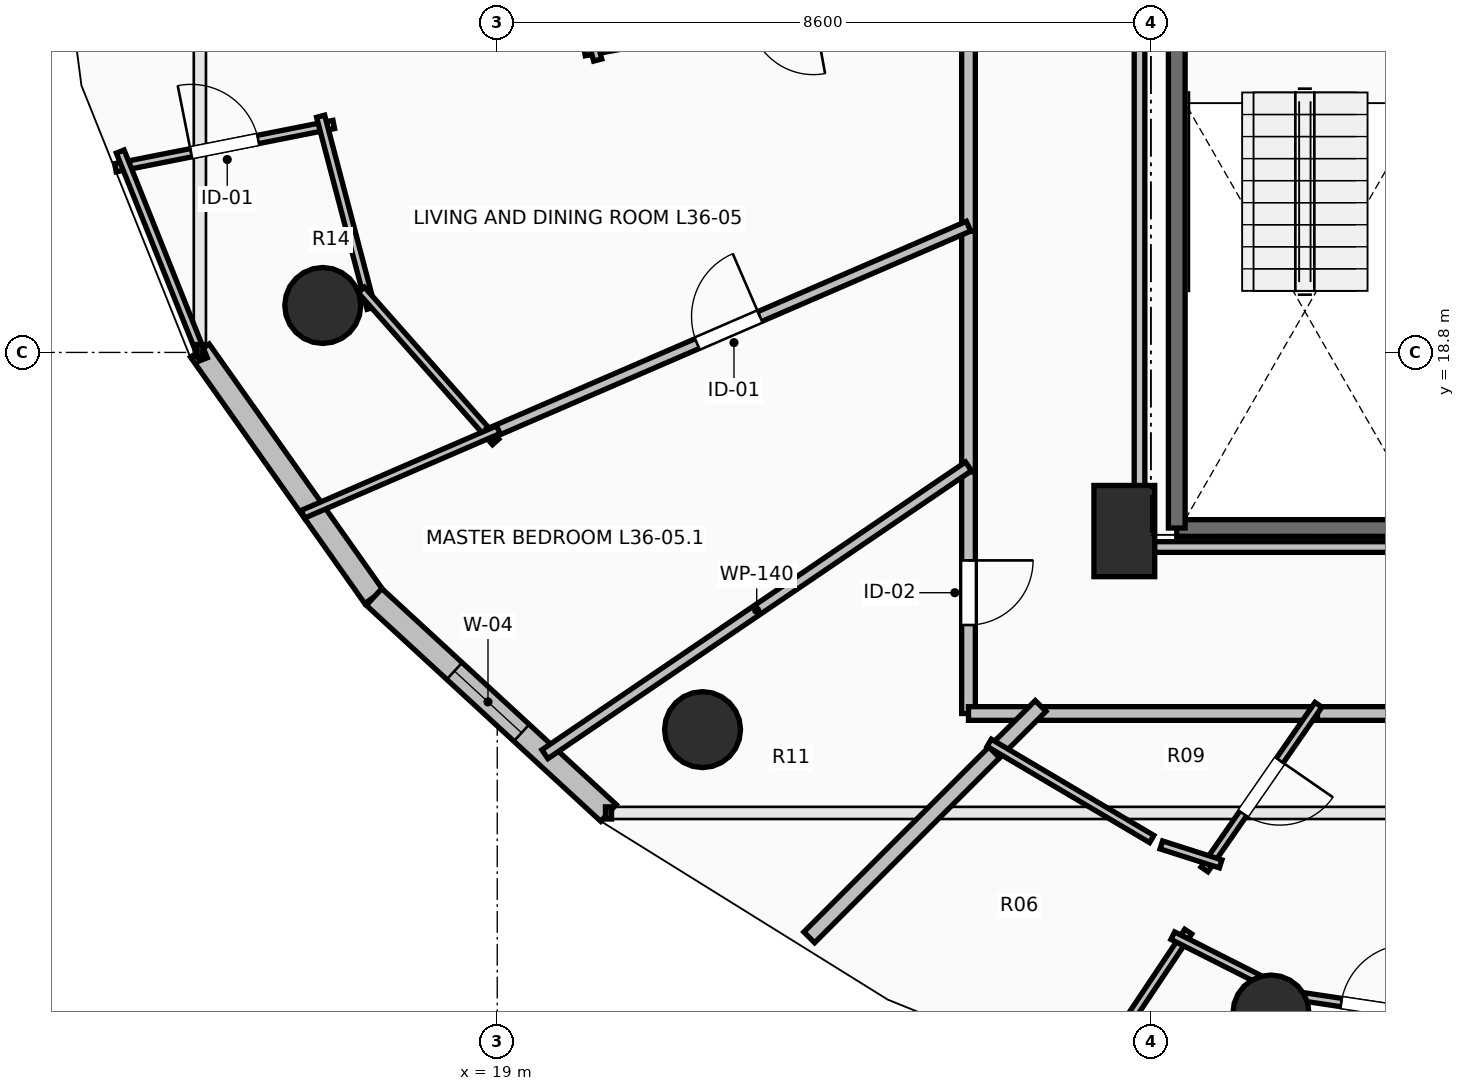
"""IFC4 building model, lengths in metres.
Left out: names, types, materials, properties, quantities, classifications, styles, units other than length and angle.
Written with IfcOpenShell. Run it as: python <this file> out.ifc"""

import sys

from ifc_helpers import new_model, si_unit, direction, frame, frame_2d, origin, origin_2d, place, context, subcontext, project, spatial, rectangle, circle, extrude, element, fill, save


model = new_model("IFC4")
c1 = context("Model", 3, precision=1e-05, world=origin(), true_north=direction((0.0, 1.0)))
c2 = subcontext(c1, "Body", "Model", "MODEL_VIEW")
j1 = project(units=[si_unit("LENGTHUNIT", "METRE"), si_unit("PLANEANGLEUNIT", "RADIAN")], contexts=[c1])
p1 = place(None, origin())
s1 = spatial("IfcSite", under=j1, at=p1, CompositionType="ELEMENT")
p2 = place(p1, origin())
s2 = spatial("IfcBuilding", under=s1, at=p2, CompositionType="ELEMENT")
p3 = place(p2, frame((0.0, 0.0, 136.1)))
s3 = spatial("IfcBuildingStorey", under=s2, at=p3, CompositionType="ELEMENT", Elevation=136.1)
for number, where, z_axis, x_axis in (
    (1, (16.705, 19.418, 0.0), (0.0, 0.0, 1.0), (-0.924, -0.383, 0.0)),
    (2, (21.701, 13.838, 0.0), (0.0, 0.0, 1.0), (-0.707, -0.707, 0.0)),
    (3, (29.179, 10.109, 0.0), (0.0, 0.0, 1.0), (-0.383, -0.924, 0.0)),
):
    element("IfcColumn", number, at=place(p3, frame(where, z_axis=z_axis, x_axis=x_axis)), inside=s3, PredefinedType="COLUMN", context=c2, shape_type="SweptSolid", body=[
        extrude(circle(Radius=0.5, at=origin_2d()), origin(), (0.0, 0.0, 1.0), 3.5),
    ])
p4 = place(p3, frame((27.25, 16.45, 0.0), z_axis=(0.0, 0.0, 1.0), x_axis=(1.0, 0.0, 0.0)))
e4 = element("IfcColumn", 4, at=p4, inside=s3, PredefinedType="PILASTER", context=c2, shape_type="SweptSolid", body=[
    extrude(rectangle(XDim=0.8, YDim=1.2, at=origin_2d()), origin(), (0.0, 0.0, 1.0), 3.5),
])
p5 = place(p3, frame((15.088, 18.825, 0.0), z_axis=(0.0, 0.0, 1.0), x_axis=(0.577269753207, -0.816553508371, 0.0)))
e5 = element("IfcWall", 5, at=p5, inside=s3, PredefinedType="STANDARD", context=c2, shape_type="SweptSolid", body=[
    extrude(rectangle(XDim=3.97, YDim=0.3, at=frame_2d((1.985, 0.0))), origin(), (0.0, 0.0, 1.0), 3.24),
])
p6 = place(p3, frame((17.38, 15.583, 0.0), z_axis=(0.0, 0.0, 1.0), x_axis=(0.735477154165, -0.677549522693, 0.0)))
e6 = element("IfcWall", 6, at=p6, inside=s3, PredefinedType="STANDARD", context=c2, shape_type="SweptSolid", body=[
    extrude(rectangle(XDim=4.194, YDim=0.3, at=frame_2d((2.097, 0.0))), origin(), (0.0, 0.0, 1.0), 3.24),
])
p7 = place(p6, frame((1.438, 0.0, 0.85)))
e7 = element("IfcOpeningElement", 7, at=p7, cuts=e6, PredefinedType="OPENING", context=c2, shape_type="SweptSolid", body=[
    extrude(rectangle(XDim=1.2, YDim=1.95, at=frame_2d((0.6, 0.975))), frame((0.0, 0.165, 0.0), z_axis=(0.0, -1.0, 0.0), x_axis=(1.0, 0.0, 0.0)), (0.0, 0.0, 1.0), 0.33),
])
p8 = place(p3, frame((31.31, 16.49, 0.0), z_axis=(0.0, 0.0, 1.0), x_axis=(-1.0, 0.0, 0.0)))
e8 = element("IfcWall", 8, at=p8, inside=s3, PredefinedType="SOLIDWALL", context=c2, shape_type="SweptSolid", body=[
    extrude(rectangle(XDim=3.37, YDim=0.22, at=frame_2d((1.685, 0.0))), origin(), (0.0, 0.0, 1.0), 3.24),
])
p9 = place(p3, frame((27.94, 16.49, 0.0), z_axis=(0.0, 0.0, 1.0), x_axis=(0.0, 1.0, 0.0)))
e9 = element("IfcWall", 9, at=p9, inside=s3, PredefinedType="SOLIDWALL", context=c2, shape_type="SweptSolid", body=[
    extrude(rectangle(XDim=7.42, YDim=0.22, at=frame_2d((3.71, 0.0))), origin(), (0.0, 0.0, 1.0), 3.24),
])
p10 = place(p3, frame((25.2, 23.735, 0.0), z_axis=(0.0, 0.0, 1.0), x_axis=(0.0, -1.0, 0.0)))
e10 = element("IfcWall", 10, at=p10, inside=s3, PredefinedType="PARTITIONING", context=c2, shape_type="SweptSolid", body=[
    extrude(rectangle(XDim=3.339, YDim=0.18, at=frame_2d((1.669, 0.0))), origin(), (0.0, 0.0, 1.0), 3.24),
])
p11 = place(p3, frame((25.2, 20.396, 0.0), z_axis=(0.0, 0.0, 1.0), x_axis=(0.0, -1.0, 0.0)))
e11 = element("IfcWall", 11, at=p11, inside=s3, PredefinedType="PARTITIONING", context=c2, shape_type="SweptSolid", body=[
    extrude(rectangle(XDim=3.168, YDim=0.18, at=frame_2d((1.584, 0.0))), origin(), (0.0, 0.0, 1.0), 2.432),
])
p12 = place(p3, frame((25.2, 17.228, 0.0), z_axis=(0.0, 0.0, 1.0), x_axis=(0.0, -1.0, 0.0)))
e12 = element("IfcWall", 12, at=p12, inside=s3, PredefinedType="PARTITIONING", context=c2, shape_type="SweptSolid", body=[
    extrude(rectangle(XDim=3.178, YDim=0.18, at=frame_2d((1.589, 0.0))), origin(), (0.0, 0.0, 1.0), 2.432),
])
p13 = place(p12, frame((1.164, 0.0, 0.0)))
e13 = element("IfcOpeningElement", 13, at=p13, cuts=e12, PredefinedType="OPENING", context=c2, shape_type="SweptSolid", body=[
    extrude(rectangle(XDim=0.85, YDim=2.1, at=frame_2d((0.425, 1.05))), frame((0.0, 0.105, 0.0), z_axis=(0.0, -1.0, 0.0), x_axis=(1.0, 0.0, 0.0)), (0.0, 0.0, 1.0), 0.21),
])
p14 = place(p3, frame((25.2, 14.05, 0.0), z_axis=(0.0, 0.0, 1.0), x_axis=(1.0, 0.0, 0.0)))
e14 = element("IfcWall", 14, at=p14, inside=s3, PredefinedType="PARTITIONING", context=c2, shape_type="SweptSolid", body=[
    extrude(rectangle(XDim=0.91, YDim=0.18, at=frame_2d((0.455, 0.0))), origin(), (0.0, 0.0, 1.0), 2.874),
])
p15 = place(p3, frame((29.651, 14.05, 0.0), z_axis=(0.0, 0.0, 1.0), x_axis=(1.0, 0.0, 0.0)))
e15 = element("IfcWall", 15, at=p15, inside=s3, PredefinedType="PARTITIONING", context=c2, shape_type="SweptSolid", body=[
    extrude(rectangle(XDim=3.678, YDim=0.18, at=frame_2d((1.839, 0.0))), origin(), (0.0, 0.0, 1.0), 2.922),
])
p16 = place(p15, frame((1.339, 0.0, 0.0)))
e16 = element("IfcOpeningElement", 16, at=p16, cuts=e15, PredefinedType="OPENING", context=c2, shape_type="SweptSolid", body=[
    extrude(rectangle(XDim=1.0, YDim=2.15, at=frame_2d((0.5, 1.075))), frame((0.0, 0.105, 0.0), z_axis=(0.0, -1.0, 0.0), x_axis=(1.0, 0.0, 0.0)), (0.0, 0.0, 1.0), 0.21),
])
p17 = place(p3, frame((25.97, 14.05, 0.0), z_axis=(0.0, 0.0, 1.0), x_axis=(1.0, 0.0, 0.0)))
e17 = element("IfcWall", 17, at=p17, inside=s3, PredefinedType="PARTITIONING", context=c2, shape_type="SweptSolid", body=[
    extrude(rectangle(XDim=3.821, YDim=0.18, at=frame_2d((1.911, 0.0))), origin(), (0.0, 0.0, 1.0), 2.432),
])
p18 = place(p3, frame((25.338, 23.7, 0.0), z_axis=(0.0, 0.0, 1.0), x_axis=(-0.983892120625, -0.178763237197, 0.0)))
e18 = element("IfcWall", 18, at=p18, inside=s3, PredefinedType="PARTITIONING", context=c2, shape_type="SweptSolid", body=[
    extrude(rectangle(XDim=5.274, YDim=0.11, at=frame_2d((2.637, 0.0))), origin(), (0.0, 0.0, 1.0), 2.922),
])
p19 = place(p18, frame((2.212, 0.0, 0.0)))
e19 = element("IfcOpeningElement", 19, at=p19, cuts=e18, PredefinedType="OPENING", context=c2, shape_type="SweptSolid", body=[
    extrude(rectangle(XDim=0.85, YDim=2.1, at=frame_2d((0.425, 1.05))), frame((0.0, 0.07, 0.0), z_axis=(0.0, -1.0, 0.0), x_axis=(1.0, 0.0, 0.0)), (0.0, 0.0, 1.0), 0.14),
])
p20 = place(p3, frame((20.322, 22.646, 0.0), z_axis=(0.0, 0.0, 1.0), x_axis=(-0.254316581286, 0.967121024734, 0.0)))
e20 = element("IfcWall", 20, at=p20, inside=s3, PredefinedType="PARTITIONING", context=c2, shape_type="SweptSolid", body=[
    extrude(rectangle(XDim=2.108, YDim=0.11, at=frame_2d((1.054, 0.0))), origin(), (0.0, 0.0, 1.0), 3.24),
])
p21 = place(p3, frame((13.977, 21.23, 0.0), z_axis=(0.0, 0.0, 1.0), x_axis=(0.980903189798, 0.194496612425, 0.0)))
e21 = element("IfcWall", 21, at=p21, inside=s3, PredefinedType="PARTITIONING", context=c2, shape_type="SweptSolid", body=[
    extrude(rectangle(XDim=2.928, YDim=0.11, at=frame_2d((1.464, 0.0))), origin(), (0.0, 0.0, 1.0), 2.728),
])
p22 = place(p21, frame((1.014, 0.0, 0.0)))
e22 = element("IfcOpeningElement", 22, at=p22, cuts=e21, PredefinedType="OPENING", context=c2, shape_type="SweptSolid", body=[
    extrude(rectangle(XDim=0.9, YDim=2.1, at=frame_2d((0.45, 1.05))), frame((0.0, 0.07, 0.0), z_axis=(0.0, -1.0, 0.0), x_axis=(1.0, 0.0, 0.0)), (0.0, 0.0, 1.0), 0.14),
])
p23 = place(p3, frame((16.677, 21.907, 0.0), z_axis=(0.0, 0.0, 1.0), x_axis=(0.254263226868, -0.967135053373, 0.0)))
e23 = element("IfcWall", 23, at=p23, inside=s3, PredefinedType="PARTITIONING", context=c2, shape_type="SweptSolid", body=[
    extrude(rectangle(XDim=2.612, YDim=0.11, at=frame_2d((1.306, 0.0))), origin(), (0.0, 0.0, 1.0), 2.432),
])
p24 = place(p3, frame((17.212, 19.622, 0.0), z_axis=(0.0, 0.0, 1.0), x_axis=(0.662196601313, -0.749330141666, 0.0)))
e24 = element("IfcWall", 24, at=p24, inside=s3, PredefinedType="PARTITIONING", context=c2, shape_type="SweptSolid", body=[
    extrude(rectangle(XDim=2.667, YDim=0.11, at=frame_2d((1.334, 0.0))), origin(), (0.0, 0.0, 1.0), 2.432),
])
p25 = place(p3, frame((14.04, 21.443, 0.0), z_axis=(0.0, 0.0, 1.0), x_axis=(0.371490730185, -0.928436663099, 0.0)))
e25 = element("IfcWall", 25, at=p25, inside=s3, PredefinedType="PARTITIONING", context=c2, shape_type="SweptSolid", body=[
    extrude(rectangle(XDim=2.945, YDim=0.11, at=frame_2d((1.472, 0.0))), origin(), (0.0, 0.0, 1.0), 3.24),
])
p26 = place(p3, frame((18.886, 17.728, 0.0), z_axis=(0.0, 0.0, 1.0), x_axis=(0.917722116807, 0.397223005782, 0.0)))
e26 = element("IfcWall", 26, at=p26, inside=s3, PredefinedType="PARTITIONING", context=c2, shape_type="SweptSolid", body=[
    extrude(rectangle(XDim=6.88, YDim=0.14, at=frame_2d((3.44, 0.0))), origin(), (0.0, 0.0, 1.0), 2.432),
])
p27 = place(p26, frame((2.99, 0.0, 0.0)))
e27 = element("IfcOpeningElement", 27, at=p27, cuts=e26, PredefinedType="OPENING", context=c2, shape_type="SweptSolid", body=[
    extrude(rectangle(XDim=0.9, YDim=2.1, at=frame_2d((0.45, 1.05))), frame((0.0, 0.085, 0.0), z_axis=(0.0, -1.0, 0.0), x_axis=(1.0, 0.0, 0.0)), (0.0, 0.0, 1.0), 0.17),
])
p28 = place(p3, frame((16.444, 16.671, 0.0), z_axis=(0.0, 0.0, 1.0), x_axis=(0.91777806569, 0.39709371959, 0.0)))
e28 = element("IfcWall", 28, at=p28, inside=s3, PredefinedType="PARTITIONING", context=c2, shape_type="SweptSolid", body=[
    extrude(rectangle(XDim=2.801, YDim=0.11, at=frame_2d((1.4, 0.0))), origin(), (0.0, 0.0, 1.0), 2.728),
])
p29 = place(p3, frame((19.627, 13.514, 0.0), z_axis=(0.0, 0.0, 1.0), x_axis=(0.827101009155, 0.562053307663, 0.0)))
e29 = element("IfcWall", 29, at=p29, inside=s3, PredefinedType="PARTITIONING", context=c2, shape_type="SweptSolid", body=[
    extrude(rectangle(XDim=6.738, YDim=0.14, at=frame_2d((3.369, 0.0))), origin(), (0.0, 0.0, 1.0), 2.432),
])
p30 = place(p3, frame((23.105, 11.105, 0.0), z_axis=(0.0, 0.0, 1.0), x_axis=(0.707106781187, 0.707106781187, 0.0)))
e30 = element("IfcWall", 30, at=p30, inside=s3, PredefinedType="PARTITIONING", context=c2, shape_type="SweptSolid", body=[
    extrude(rectangle(XDim=3.581, YDim=0.2, at=frame_2d((1.791, 0.0))), origin(), (0.0, 0.0, 1.0), 2.728),
])
p31 = place(p3, frame((25.538, 13.538, 0.0), z_axis=(0.0, 0.0, 1.0), x_axis=(0.707106781187, 0.707106781187, 0.0)))
e31 = element("IfcWall", 31, at=p31, inside=s3, PredefinedType="PARTITIONING", context=c2, shape_type="SweptSolid", body=[
    extrude(rectangle(XDim=0.864, YDim=0.2, at=frame_2d((0.432, 0.0))), origin(), (0.0, 0.0, 1.0), 2.874),
])
p32 = place(p3, frame((29.804, 14.165, 0.0), z_axis=(0.0, 0.0, 1.0), x_axis=(-0.569156972472, -0.822228885826, 0.0)))
e32 = element("IfcWall", 32, at=p32, inside=s3, PredefinedType="PARTITIONING", context=c2, shape_type="SweptSolid", body=[
    extrude(rectangle(XDim=2.635, YDim=0.11, at=frame_2d((1.317, 0.0))), origin(), (0.0, 0.0, 1.0), 2.432),
])
p33 = place(p32, frame((0.892, 0.0, 0.0)))
e33 = element("IfcOpeningElement", 33, at=p33, cuts=e32, PredefinedType="OPENING", context=c2, shape_type="SweptSolid", body=[
    extrude(rectangle(XDim=0.85, YDim=2.1, at=frame_2d((0.425, 1.05))), frame((0.0, 0.07, 0.0), z_axis=(0.0, -1.0, 0.0), x_axis=(1.0, 0.0, 0.0)), (0.0, 0.0, 1.0), 0.14),
])
p34 = place(p3, frame((28.517, 12.071, 0.0), z_axis=(0.0, 0.0, 1.0), x_axis=(-0.952627998304, 0.304137956932, 0.0)))
e34 = element("IfcWall", 34, at=p34, inside=s3, PredefinedType="PARTITIONING", context=c2, shape_type="SweptSolid", body=[
    extrude(rectangle(XDim=0.82, YDim=0.11, at=frame_2d((0.41, 0.0))), origin(), (0.0, 0.0, 1.0), 2.432),
])
p35 = place(p3, frame((27.611, 12.399, 0.0), z_axis=(0.0, 0.0, 1.0), x_axis=(-0.860546797705, 0.509371386082, 0.0)))
e35 = element("IfcWall", 35, at=p35, inside=s3, PredefinedType="PARTITIONING", context=c2, shape_type="SweptSolid", body=[
    extrude(rectangle(XDim=2.485, YDim=0.11, at=frame_2d((1.242, 0.0))), origin(), (0.0, 0.0, 1.0), 2.874),
])
p36 = place(p3, frame((26.785, 9.228, 0.0), z_axis=(0.0, 0.0, 1.0), x_axis=(0.555802936367, 0.831314077786, 0.0)))
e36 = element("IfcWall", 36, at=p36, inside=s3, PredefinedType="PARTITIONING", context=c2, shape_type="SweptSolid", body=[
    extrude(rectangle(XDim=2.349, YDim=0.11, at=frame_2d((1.175, 0.0))), origin(), (0.0, 0.0, 1.0), 2.728),
])
p37 = place(p3, frame((27.888, 11.127, 0.0), z_axis=(0.0, 0.0, 1.0), x_axis=(0.892534718882, -0.450978686403, 0.0)))
e37 = element("IfcWall", 37, at=p37, inside=s3, PredefinedType="PARTITIONING", context=c2, shape_type="SweptSolid", body=[
    extrude(rectangle(XDim=1.865, YDim=0.11, at=frame_2d((0.933, 0.0))), origin(), (0.0, 0.0, 1.0), 2.432),
])
p38 = place(p3, frame((29.29, 10.37, 0.0), z_axis=(0.0, 0.0, 1.0), x_axis=(0.988887788943, -0.148663851958, 0.0)))
e38 = element("IfcWall", 38, at=p38, inside=s3, PredefinedType="PARTITIONING", context=c2, shape_type="SweptSolid", body=[
    extrude(rectangle(XDim=2.547, YDim=0.11, at=frame_2d((1.273, 0.0))), origin(), (0.0, 0.0, 1.0), 3.24),
])
p39 = place(p38, frame((0.823, 0.0, 0.0)))
e39 = element("IfcOpeningElement", 39, at=p39, cuts=e38, PredefinedType="OPENING", context=c2, shape_type="SweptSolid", body=[
    extrude(rectangle(XDim=0.9, YDim=2.1, at=frame_2d((0.45, 1.05))), frame((0.0, 0.07, 0.0), z_axis=(0.0, -1.0, 0.0), x_axis=(1.0, 0.0, 0.0)), (0.0, 0.0, 1.0), 0.14),
])
p40 = place(p3, frame((27.45, 23.754, 0.0), z_axis=(0.0, 0.0, 1.0), x_axis=(0.0, -1.0, 0.0)))
e40 = element("IfcWall", 40, at=p40, inside=s3, PredefinedType="PARTITIONING", context=c2, shape_type="SweptSolid", body=[
    extrude(rectangle(XDim=7.514, YDim=0.14, at=frame_2d((3.757, 0.0))), origin(), (0.0, 0.0, 1.0), 2.432),
])
p41 = place(p3, frame((27.45, 16.24, 0.0), z_axis=(0.0, 0.0, 1.0), x_axis=(1.0, 0.0, 0.0)))
e41 = element("IfcWall", 41, at=p41, inside=s3, PredefinedType="PARTITIONING", context=c2, shape_type="SweptSolid", body=[
    extrude(rectangle(XDim=3.745, YDim=0.14, at=frame_2d((1.873, 0.0))), origin(), (0.0, 0.0, 1.0), 2.432),
])
p42 = place(p7, origin())
e42 = element("IfcWindow", 42, at=p42, inside=s3, PartitioningType="SINGLE_PANEL", PredefinedType="WINDOW", context=c2, shape_type="SweptSolid", body=[
    extrude(rectangle(XDim=1.2, YDim=1.95, at=frame_2d((0.6, 0.975))), frame((0.0, 0.03, 0.0), z_axis=(0.0, -1.0, 0.0), x_axis=(1.0, 0.0, 0.0)), (0.0, 0.0, 1.0), 0.06),
])
fill(e7, e42)
p43 = place(p22, origin())
e43 = element("IfcDoor", 43, at=p43, inside=s3, OperationType="SINGLE_SWING_LEFT", PredefinedType="DOOR", context=c2, shape_type="SweptSolid", body=[
    extrude(rectangle(XDim=0.9, YDim=2.1, at=frame_2d((0.45, 1.05))), frame((0.0, 0.025, 0.0), z_axis=(0.0, -1.0, 0.0), x_axis=(1.0, 0.0, 0.0)), (0.0, 0.0, 1.0), 0.05),
])
fill(e22, e43)
p44 = place(p27, origin())
e44 = element("IfcDoor", 44, at=p44, inside=s3, OperationType="SINGLE_SWING_RIGHT", PredefinedType="DOOR", context=c2, shape_type="SweptSolid", body=[
    extrude(rectangle(XDim=0.9, YDim=2.1, at=frame_2d((0.45, 1.05))), frame((0.0, 0.025, 0.0), z_axis=(0.0, -1.0, 0.0), x_axis=(1.0, 0.0, 0.0)), (0.0, 0.0, 1.0), 0.05),
])
fill(e27, e44)
p45 = place(p33, origin())
e45 = element("IfcDoor", 45, at=p45, inside=s3, OperationType="SINGLE_SWING_LEFT", PredefinedType="DOOR", context=c2, shape_type="SweptSolid", body=[
    extrude(rectangle(XDim=0.85, YDim=2.1, at=frame_2d((0.425, 1.05))), frame((0.0, 0.025, 0.0), z_axis=(0.0, -1.0, 0.0), x_axis=(1.0, 0.0, 0.0)), (0.0, 0.0, 1.0), 0.05),
])
fill(e33, e45)
p46 = place(p39, origin())
e46 = element("IfcDoor", 46, at=p46, inside=s3, OperationType="SINGLE_SWING_RIGHT", PredefinedType="DOOR", context=c2, shape_type="SweptSolid", body=[
    extrude(rectangle(XDim=0.9, YDim=2.1, at=frame_2d((0.45, 1.05))), frame((0.0, 0.025, 0.0), z_axis=(0.0, -1.0, 0.0), x_axis=(1.0, 0.0, 0.0)), (0.0, 0.0, 1.0), 0.05),
])
fill(e39, e46)
p47 = place(p13, origin())
e47 = element("IfcDoor", 47, at=p47, inside=s3, OperationType="SINGLE_SWING_LEFT", PredefinedType="DOOR", context=c2, shape_type="SweptSolid", body=[
    extrude(rectangle(XDim=0.85, YDim=2.1, at=frame_2d((0.425, 1.05))), frame((0.0, 0.025, 0.0), z_axis=(0.0, -1.0, 0.0), x_axis=(1.0, 0.0, 0.0)), (0.0, 0.0, 1.0), 0.05),
])
fill(e13, e47)
save(model, sys.argv[1])
